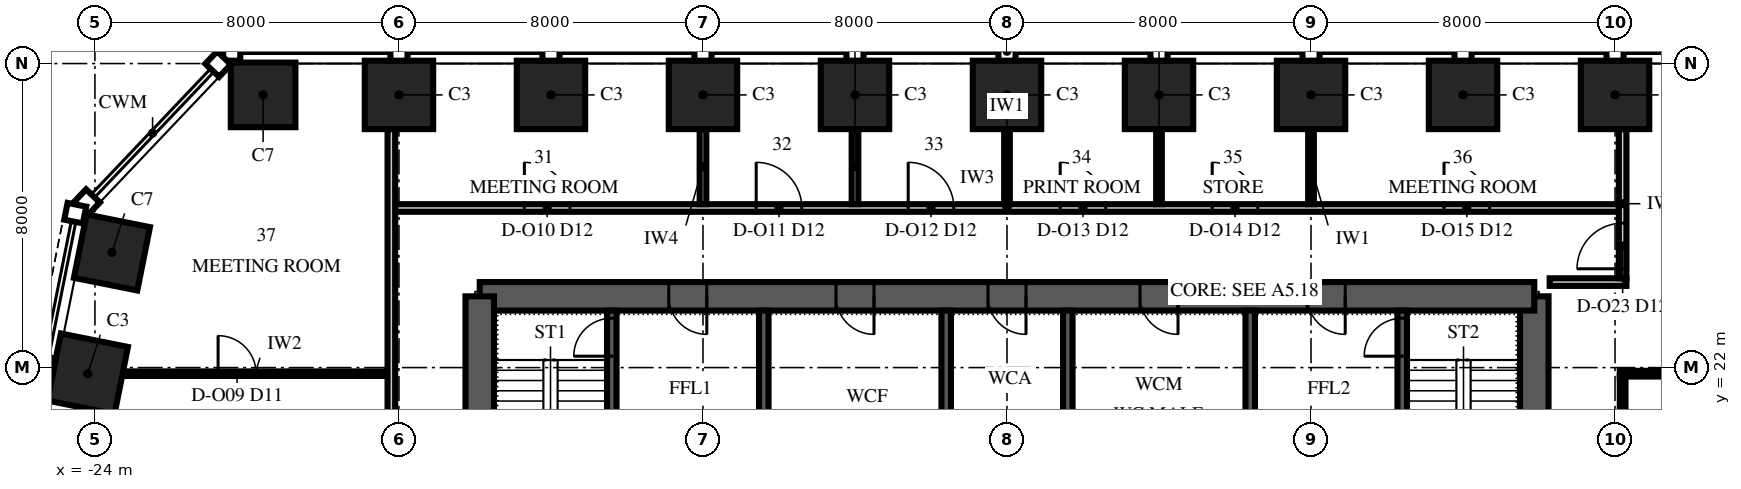
"""IFC4 building model, lengths in metres.
Left out: names, types, materials, properties, quantities, classifications, styles, units other than length and angle.
Written with IfcOpenShell. Run it as: python <this file> out.ifc"""

import sys

from ifc_helpers import new_model, si_unit, direction, frame, frame_2d, origin, origin_2d, place, context, subcontext, project, spatial, polyline, rectangle, outline, extrude, element, fill, save


model = new_model("IFC4")
c1 = context("Model", 3, precision=1e-05, world=origin(), true_north=direction((0.0, 1.0)))
c2 = subcontext(c1, "Body", "Model", "MODEL_VIEW")
j1 = project(units=[si_unit("LENGTHUNIT", "METRE"), si_unit("PLANEANGLEUNIT", "RADIAN")], contexts=[c1])
p1 = place(None, origin())
s1 = spatial("IfcSite", under=j1, at=p1, CompositionType="ELEMENT")
p2 = place(p1, origin())
s2 = spatial("IfcBuilding", under=s1, at=p2, CompositionType="ELEMENT")
p3 = place(p2, frame((0.0, 0.0, 115.0)))
s3 = spatial("IfcBuildingStorey", under=s2, at=p3, CompositionType="ELEMENT", Elevation=115.0)
for number, where, z_axis, x_axis in (
    (1, (16.0, 29.175, 0.0), (0.0, 0.0, 1.0), (-1.0, 0.0, 0.0)),
    (2, (12.0, 29.175, 0.0), (0.0, 0.0, 1.0), (-1.0, 0.0, 0.0)),
    (3, (8.0, 29.175, 0.0), (0.0, 0.0, 1.0), (-1.0, 0.0, 0.0)),
    (4, (4.0, 29.175, 0.0), (0.0, 0.0, 1.0), (-1.0, 0.0, 0.0)),
    (5, (0.0, 29.175, 0.0), (0.0, 0.0, 1.0), (-1.0, 0.0, 0.0)),
    (6, (-4.0, 29.175, 0.0), (0.0, 0.0, 1.0), (-1.0, 0.0, 0.0)),
    (7, (-8.0, 29.175, 0.0), (0.0, 0.0, 1.0), (-1.0, 0.0, 0.0)),
    (8, (-12.0, 29.175, 0.0), (0.0, 0.0, 1.0), (-1.0, 0.0, 0.0)),
    (9, (-16.0, 29.175, 0.0), (0.0, 0.0, 1.0), (-1.0, 0.0, 0.0)),
):
    element("IfcColumn", number, at=place(p3, frame(where, z_axis=z_axis, x_axis=x_axis)), inside=s3, PredefinedType="COLUMN", context=c2, shape_type="SweptSolid", body=[
        extrude(rectangle(XDim=1.8, YDim=1.8, at=origin_2d()), origin(), (0.0, 0.0, 1.0), 4.0),
    ])
for number, where, z_axis, x_axis in (
    (10, (-19.575, 29.175, 0.0), (0.0, 0.0, 1.0), (-1.0, 0.0, 0.0)),
    (11, (-23.553, 25.029, 0.0), (0.0, 0.0, 1.0), (-0.196, -0.981, 0.0)),
):
    element("IfcColumn", number, at=place(p3, frame(where, z_axis=z_axis, x_axis=x_axis)), inside=s3, PredefinedType="COLUMN", context=c2, shape_type="SweptSolid", body=[
        extrude(rectangle(XDim=1.7, YDim=1.7, at=origin_2d()), origin(), (0.0, 0.0, 1.0), 4.0),
    ])
p4 = place(p3, frame((-24.191, 21.838, 0.0), z_axis=(0.0, 0.0, 1.0), x_axis=(-0.196116135138, -0.980580675691, 0.0)))
e12 = element("IfcColumn", 12, at=p4, inside=s3, PredefinedType="COLUMN", context=c2, shape_type="SweptSolid", body=[
    extrude(rectangle(XDim=1.8, YDim=1.8, at=origin_2d()), origin(), (0.0, 0.0, 1.0), 4.0),
])
p5 = place(p3, frame((13.875, 6.125, 0.0), z_axis=(0.0, 0.0, 1.0), x_axis=(0.0, 1.0, 0.0)))
e13 = element("IfcWall", 13, at=p5, inside=s3, PredefinedType="SHEAR", context=c2, shape_type="SweptSolid", body=[
    extrude(outline(polyline([(0.0, -0.375), (17.75, -0.375), (17.75, 0.0), (17.375, 0.0), (17.375, 0.375), (0.375, 0.375), (0.375, 0.0), (0.0, 0.0), (0.0, -0.375)])), origin(), (0.0, 0.0, 1.0), 4.0),
])
p6 = place(p5, frame((4.175, 0.0, 0.0)))
e14 = element("IfcOpeningElement", 14, at=p6, cuts=e13, PredefinedType="OPENING", context=c2, shape_type="SweptSolid", body=[
    extrude(rectangle(XDim=1.8, YDim=2.4, at=frame_2d((0.9, 1.2))), frame((0.0, 0.39, 0.0), z_axis=(0.0, -1.0, 0.0), x_axis=(1.0, 0.0, 0.0)), (0.0, 0.0, 1.0), 0.78),
])
p7 = place(p3, frame((13.875, 23.875, 0.0), z_axis=(0.0, 0.0, 1.0), x_axis=(-1.0, 0.0, 0.0)))
e15 = element("IfcWall", 15, at=p7, inside=s3, PredefinedType="SHEAR", context=c2, shape_type="SweptSolid", body=[
    extrude(rectangle(XDim=27.75, YDim=0.75, at=frame_2d((13.875, 0.0))), origin(), (0.0, 0.0, 1.0), 4.0),
])
p8 = place(p7, frame((21.775, 0.0, 0.0)))
e16 = element("IfcOpeningElement", 16, at=p8, cuts=e15, PredefinedType="OPENING", context=c2, shape_type="SweptSolid", body=[
    extrude(rectangle(XDim=1.0, YDim=2.1, at=frame_2d((0.5, 1.05))), frame((0.0, 0.39, 0.0), z_axis=(0.0, -1.0, 0.0), x_axis=(1.0, 0.0, 0.0)), (0.0, 0.0, 1.0), 0.78),
])
p9 = place(p7, frame((4.975, 0.0, 0.0)))
e17 = element("IfcOpeningElement", 17, at=p9, cuts=e15, PredefinedType="OPENING", context=c2, shape_type="SweptSolid", body=[
    extrude(rectangle(XDim=1.0, YDim=2.1, at=frame_2d((0.5, 1.05))), frame((0.0, 0.39, 0.0), z_axis=(0.0, -1.0, 0.0), x_axis=(1.0, 0.0, 0.0)), (0.0, 0.0, 1.0), 0.78),
])
p10 = place(p7, frame((17.375, 0.0, 0.0)))
e18 = element("IfcOpeningElement", 18, at=p10, cuts=e15, PredefinedType="OPENING", context=c2, shape_type="SweptSolid", body=[
    extrude(rectangle(XDim=1.0, YDim=2.1, at=frame_2d((0.5, 1.05))), frame((0.0, 0.39, 0.0), z_axis=(0.0, -1.0, 0.0), x_axis=(1.0, 0.0, 0.0)), (0.0, 0.0, 1.0), 0.78),
])
p11 = place(p7, frame((13.375, 0.0, 0.0)))
e19 = element("IfcOpeningElement", 19, at=p11, cuts=e15, PredefinedType="OPENING", context=c2, shape_type="SweptSolid", body=[
    extrude(rectangle(XDim=1.0, YDim=2.1, at=frame_2d((0.5, 1.05))), frame((0.0, 0.39, 0.0), z_axis=(0.0, -1.0, 0.0), x_axis=(1.0, 0.0, 0.0)), (0.0, 0.0, 1.0), 0.78),
])
p12 = place(p7, frame((9.375, 0.0, 0.0)))
e20 = element("IfcOpeningElement", 20, at=p12, cuts=e15, PredefinedType="OPENING", context=c2, shape_type="SweptSolid", body=[
    extrude(rectangle(XDim=1.0, YDim=2.1, at=frame_2d((0.5, 1.05))), frame((0.0, 0.39, 0.0), z_axis=(0.0, -1.0, 0.0), x_axis=(1.0, 0.0, 0.0)), (0.0, 0.0, 1.0), 0.78),
])
p13 = place(p3, frame((-13.875, 23.875, 0.0), z_axis=(0.0, 0.0, 1.0), x_axis=(0.0, -1.0, 0.0)))
e21 = element("IfcWall", 21, at=p13, inside=s3, PredefinedType="SHEAR", context=c2, shape_type="SweptSolid", body=[
    extrude(outline(polyline([(0.0, -0.375), (17.75, -0.375), (17.75, 0.0), (17.375, 0.0), (17.375, 0.375), (0.375, 0.375), (0.375, 0.0), (0.0, 0.0), (0.0, -0.375)])), origin(), (0.0, 0.0, 1.0), 4.0),
])
p14 = place(p13, frame((11.775, 0.0, 0.0)))
e22 = element("IfcOpeningElement", 22, at=p14, cuts=e21, PredefinedType="OPENING", context=c2, shape_type="SweptSolid", body=[
    extrude(rectangle(XDim=1.8, YDim=2.4, at=frame_2d((0.9, 1.2))), frame((0.0, 0.39, 0.0), z_axis=(0.0, -1.0, 0.0), x_axis=(1.0, 0.0, 0.0)), (0.0, 0.0, 1.0), 0.78),
])
p15 = place(p3, frame((-10.4, 16.125, 0.0), z_axis=(0.0, 0.0, 1.0), x_axis=(0.0, 1.0, 0.0)))
e23 = element("IfcWall", 23, at=p15, inside=s3, PredefinedType="SHEAR", context=c2, shape_type="SweptSolid", body=[
    extrude(rectangle(XDim=7.375, YDim=0.25, at=frame_2d((3.688, 0.0))), origin(), (0.0, 0.0, 1.0), 4.0),
])
p16 = place(p15, frame((6.175, 0.0, 0.0)))
e24 = element("IfcOpeningElement", 24, at=p16, cuts=e23, PredefinedType="OPENING", context=c2, shape_type="SweptSolid", body=[
    extrude(rectangle(XDim=1.0, YDim=2.1, at=frame_2d((0.5, 1.05))), frame((0.0, 0.14, 0.0), z_axis=(0.0, -1.0, 0.0), x_axis=(1.0, 0.0, 0.0)), (0.0, 0.0, 1.0), 0.28),
])
for number, where, z_axis, x_axis in (
    (25, (-6.4, 16.125, 0.0), (0.0, 0.0, 1.0), (0.0, 1.0, 0.0)),
    (26, (-1.6, 16.125, 0.0), (0.0, 0.0, 1.0), (0.0, 1.0, 0.0)),
    (27, (1.6, 16.125, 0.0), (0.0, 0.0, 1.0), (0.0, 1.0, 0.0)),
    (28, (6.4, 16.125, 0.0), (0.0, 0.0, 1.0), (0.0, 1.0, 0.0)),
):
    element("IfcWall", number, at=place(p3, frame(where, z_axis=z_axis, x_axis=x_axis)), inside=s3, PredefinedType="SHEAR", context=c2, shape_type="SweptSolid", body=[
        extrude(rectangle(XDim=7.375, YDim=0.25, at=frame_2d((3.688, 0.0))), origin(), (0.0, 0.0, 1.0), 4.0),
    ])
p17 = place(p3, frame((10.4, 16.125, 0.0), z_axis=(0.0, 0.0, 1.0), x_axis=(0.0, 1.0, 0.0)))
e29 = element("IfcWall", 29, at=p17, inside=s3, PredefinedType="SHEAR", context=c2, shape_type="SweptSolid", body=[
    extrude(rectangle(XDim=7.375, YDim=0.25, at=frame_2d((3.688, 0.0))), origin(), (0.0, 0.0, 1.0), 4.0),
])
p18 = place(p17, frame((6.175, 0.0, 0.0)))
e30 = element("IfcOpeningElement", 30, at=p18, cuts=e29, PredefinedType="OPENING", context=c2, shape_type="SweptSolid", body=[
    extrude(rectangle(XDim=1.0, YDim=2.1, at=frame_2d((0.5, 1.05))), frame((0.0, 0.14, 0.0), z_axis=(0.0, -1.0, 0.0), x_axis=(1.0, 0.0, 0.0)), (0.0, 0.0, 1.0), 0.28),
])
p19 = place(p3, frame((-23.273, 21.84, 0.0), z_axis=(0.0, 0.0, 1.0), x_axis=(1.0, 0.0, 0.0)))
e31 = element("IfcWall", 31, at=p19, inside=s3, PredefinedType="PARTITIONING", context=c2, shape_type="SweptSolid", body=[
    extrude(rectangle(XDim=6.973, YDim=0.12, at=frame_2d((3.486, 0.0))), origin(), (0.0, 0.0, 1.0), 3.25),
])
p20 = place(p19, frame((2.514, 0.0, 0.0)))
e32 = element("IfcOpeningElement", 32, at=p20, cuts=e31, PredefinedType="OPENING", context=c2, shape_type="SweptSolid", body=[
    extrude(rectangle(XDim=1.0, YDim=2.4, at=frame_2d((0.5, 1.2))), frame((0.0, 0.075, 0.0), z_axis=(0.0, -1.0, 0.0), x_axis=(1.0, 0.0, 0.0)), (0.0, 0.0, 1.0), 0.15),
])
p21 = place(p3, frame((16.125, 21.84, 0.0), z_axis=(0.0, 0.0, 1.0), x_axis=(1.0, 0.0, 0.0)))
e33 = element("IfcWall", 33, at=p21, inside=s3, PredefinedType="PARTITIONING", context=c2, shape_type="SweptSolid", body=[
    extrude(rectangle(XDim=3.75, YDim=0.15, at=frame_2d((1.875, 0.0))), origin(), (0.0, 0.0, 1.0), 3.4),
])
p22 = place(p3, frame((14.28, 24.25, 0.0), z_axis=(0.0, 0.0, 1.0), x_axis=(1.0, 0.0, 0.0)))
e34 = element("IfcWall", 34, at=p22, inside=s3, PredefinedType="PARTITIONING", context=c2, shape_type="SweptSolid", body=[
    extrude(rectangle(XDim=2.02, YDim=0.2, at=frame_2d((1.01, 0.0))), origin(), (0.0, 0.0, 1.0), 3.4),
])
p23 = place(p3, frame((-16.1, 26.2, 0.0), z_axis=(0.0, 0.0, 1.0), x_axis=(1.0, 0.0, 0.0)))
e35 = element("IfcWall", 35, at=p23, inside=s3, PredefinedType="PARTITIONING", context=c2, shape_type="SweptSolid", body=[
    extrude(rectangle(XDim=32.2, YDim=0.2, at=frame_2d((16.1, 0.0))), origin(), (0.0, 0.0, 1.0), 3.4),
])
p24 = place(p23, frame((3.4, 0.0, 0.0)))
e36 = element("IfcOpeningElement", 36, at=p24, cuts=e35, PredefinedType="OPENING", context=c2, shape_type="SweptSolid", body=[
    extrude(rectangle(XDim=1.2, YDim=2.4, at=frame_2d((0.6, 1.2))), frame((0.0, 0.115, 0.0), z_axis=(0.0, -1.0, 0.0), x_axis=(1.0, 0.0, 0.0)), (0.0, 0.0, 1.0), 0.23),
])
p25 = place(p23, frame((9.5, 0.0, 0.0)))
e37 = element("IfcOpeningElement", 37, at=p25, cuts=e35, PredefinedType="OPENING", context=c2, shape_type="SweptSolid", body=[
    extrude(rectangle(XDim=1.2, YDim=2.4, at=frame_2d((0.6, 1.2))), frame((0.0, 0.115, 0.0), z_axis=(0.0, -1.0, 0.0), x_axis=(1.0, 0.0, 0.0)), (0.0, 0.0, 1.0), 0.23),
])
p26 = place(p23, frame((13.5, 0.0, 0.0)))
e38 = element("IfcOpeningElement", 38, at=p26, cuts=e35, PredefinedType="OPENING", context=c2, shape_type="SweptSolid", body=[
    extrude(rectangle(XDim=1.2, YDim=2.4, at=frame_2d((0.6, 1.2))), frame((0.0, 0.115, 0.0), z_axis=(0.0, -1.0, 0.0), x_axis=(1.0, 0.0, 0.0)), (0.0, 0.0, 1.0), 0.23),
])
p27 = place(p23, frame((17.5, 0.0, 0.0)))
e39 = element("IfcOpeningElement", 39, at=p27, cuts=e35, PredefinedType="OPENING", context=c2, shape_type="SweptSolid", body=[
    extrude(rectangle(XDim=1.2, YDim=2.4, at=frame_2d((0.6, 1.2))), frame((0.0, 0.115, 0.0), z_axis=(0.0, -1.0, 0.0), x_axis=(1.0, 0.0, 0.0)), (0.0, 0.0, 1.0), 0.23),
])
p28 = place(p23, frame((21.5, 0.0, 0.0)))
e40 = element("IfcOpeningElement", 40, at=p28, cuts=e35, PredefinedType="OPENING", context=c2, shape_type="SweptSolid", body=[
    extrude(rectangle(XDim=1.2, YDim=2.4, at=frame_2d((0.6, 1.2))), frame((0.0, 0.115, 0.0), z_axis=(0.0, -1.0, 0.0), x_axis=(1.0, 0.0, 0.0)), (0.0, 0.0, 1.0), 0.23),
])
p29 = place(p23, frame((27.6, 0.0, 0.0)))
e41 = element("IfcOpeningElement", 41, at=p29, cuts=e35, PredefinedType="OPENING", context=c2, shape_type="SweptSolid", body=[
    extrude(rectangle(XDim=1.2, YDim=2.4, at=frame_2d((0.6, 1.2))), frame((0.0, 0.115, 0.0), z_axis=(0.0, -1.0, 0.0), x_axis=(1.0, 0.0, 0.0)), (0.0, 0.0, 1.0), 0.23),
])
p30 = place(p3, frame((-16.2, 1.94, 0.0), z_axis=(0.0, 0.0, 1.0), x_axis=(0.0, 1.0, 0.0)))
e42 = element("IfcWall", 42, at=p30, inside=s3, PredefinedType="PARTITIONING", context=c2, shape_type="SweptSolid", body=[
    extrude(rectangle(XDim=26.335, YDim=0.2, at=frame_2d((13.167, 0.0))), origin(), (0.0, 0.0, 1.0), 2.842),
])
p31 = place(p30, frame((6.46, 0.0, 0.0)))
e43 = element("IfcOpeningElement", 43, at=p31, cuts=e42, PredefinedType="OPENING", context=c2, shape_type="SweptSolid", body=[
    extrude(rectangle(XDim=1.2, YDim=2.4, at=frame_2d((0.6, 1.2))), frame((0.0, 0.115, 0.0), z_axis=(0.0, -1.0, 0.0), x_axis=(1.0, 0.0, 0.0)), (0.0, 0.0, 1.0), 0.23),
])
p32 = place(p3, frame((-8.0, 26.3, 0.0), z_axis=(0.0, 0.0, 1.0), x_axis=(0.0, 1.0, 0.0)))
e44 = element("IfcWall", 44, at=p32, inside=s3, PredefinedType="PARTITIONING", context=c2, shape_type="SweptSolid", body=[
    extrude(rectangle(XDim=1.975, YDim=0.175, at=frame_2d((0.987, 0.0))), origin(), (0.0, 0.0, 1.0), 3.4),
])
p33 = place(p3, frame((-4.0, 26.3, 0.0), z_axis=(0.0, 0.0, 1.0), x_axis=(0.0, 1.0, 0.0)))
e45 = element("IfcWall", 45, at=p33, inside=s3, PredefinedType="PARTITIONING", context=c2, shape_type="SweptSolid", body=[
    extrude(rectangle(XDim=1.975, YDim=0.175, at=frame_2d((0.987, 0.0))), origin(), (0.0, 0.0, 1.0), 3.85),
])
p34 = place(p3, frame((0.0, 26.3, 0.0), z_axis=(0.0, 0.0, 1.0), x_axis=(0.0, 1.0, 0.0)))
e46 = element("IfcWall", 46, at=p34, inside=s3, PredefinedType="PARTITIONING", context=c2, shape_type="SweptSolid", body=[
    extrude(rectangle(XDim=1.975, YDim=0.15, at=frame_2d((0.987, 0.0))), origin(), (0.0, 0.0, 1.0), 3.4),
])
p35 = place(p3, frame((4.0, 26.3, 0.0), z_axis=(0.0, 0.0, 1.0), x_axis=(0.0, 1.0, 0.0)))
e47 = element("IfcWall", 47, at=p35, inside=s3, PredefinedType="PARTITIONING", context=c2, shape_type="SweptSolid", body=[
    extrude(rectangle(XDim=1.975, YDim=0.15, at=frame_2d((0.987, 0.0))), origin(), (0.0, 0.0, 1.0), 3.85),
])
p36 = place(p3, frame((8.0, 26.3, 0.0), z_axis=(0.0, 0.0, 1.0), x_axis=(0.0, 1.0, 0.0)))
e48 = element("IfcWall", 48, at=p36, inside=s3, PredefinedType="PARTITIONING", context=c2, shape_type="SweptSolid", body=[
    extrude(rectangle(XDim=1.975, YDim=0.15, at=frame_2d((0.987, 0.0))), origin(), (0.0, 0.0, 1.0), 3.4),
])
p37 = place(p3, frame((16.2, 17.915, 0.0), z_axis=(0.0, 0.0, 1.0), x_axis=(0.0, 1.0, 0.0)))
e49 = element("IfcWall", 49, at=p37, inside=s3, PredefinedType="PARTITIONING", context=c2, shape_type="SweptSolid", body=[
    extrude(rectangle(XDim=3.85, YDim=0.15, at=frame_2d((1.925, 0.0))), origin(), (0.0, 0.0, 1.0), 3.25),
])
p38 = place(p3, frame((16.2, 24.35, 0.0), z_axis=(0.0, 0.0, 1.0), x_axis=(0.0, 1.0, 0.0)))
e50 = element("IfcWall", 50, at=p38, inside=s3, PredefinedType="PARTITIONING", context=c2, shape_type="SweptSolid", body=[
    extrude(rectangle(XDim=3.925, YDim=0.2, at=frame_2d((1.962, 0.0))), origin(), (0.0, 0.0, 1.0), 3.4),
])
p39 = place(p38, frame((0.25, 0.0, 0.0)))
e51 = element("IfcOpeningElement", 51, at=p39, cuts=e50, PredefinedType="OPENING", context=c2, shape_type="SweptSolid", body=[
    extrude(rectangle(XDim=1.2, YDim=2.4, at=frame_2d((0.6, 1.2))), frame((0.0, 0.115, 0.0), z_axis=(0.0, -1.0, 0.0), x_axis=(1.0, 0.0, 0.0)), (0.0, 0.0, 1.0), 0.23),
])
p40 = place(p8, origin())
e52 = element("IfcDoor", 52, at=p40, inside=s3, OperationType="SINGLE_SWING_RIGHT", PredefinedType="DOOR", context=c2, shape_type="SweptSolid", body=[
    extrude(rectangle(XDim=1.0, YDim=2.1, at=frame_2d((0.5, 1.05))), frame((0.0, 0.375, 0.0), z_axis=(0.0, -1.0, 0.0), x_axis=(1.0, 0.0, 0.0)), (0.0, 0.0, 1.0), 0.75),
])
fill(e16, e52)
p41 = place(p9, origin())
e53 = element("IfcDoor", 53, at=p41, inside=s3, OperationType="SINGLE_SWING_RIGHT", PredefinedType="DOOR", context=c2, shape_type="SweptSolid", body=[
    extrude(rectangle(XDim=1.0, YDim=2.1, at=frame_2d((0.5, 1.05))), frame((0.0, 0.375, 0.0), z_axis=(0.0, -1.0, 0.0), x_axis=(1.0, 0.0, 0.0)), (0.0, 0.0, 1.0), 0.75),
])
fill(e17, e53)
p42 = place(p10, origin())
e54 = element("IfcDoor", 54, at=p42, inside=s3, OperationType="SINGLE_SWING_LEFT", PredefinedType="DOOR", context=c2, shape_type="SweptSolid", body=[
    extrude(rectangle(XDim=1.0, YDim=2.1, at=frame_2d((0.5, 1.05))), frame((0.0, 0.375, 0.0), z_axis=(0.0, -1.0, 0.0), x_axis=(1.0, 0.0, 0.0)), (0.0, 0.0, 1.0), 0.75),
])
fill(e18, e54)
p43 = place(p11, origin())
e55 = element("IfcDoor", 55, at=p43, inside=s3, OperationType="SINGLE_SWING_LEFT", PredefinedType="DOOR", context=c2, shape_type="SweptSolid", body=[
    extrude(rectangle(XDim=1.0, YDim=2.1, at=frame_2d((0.5, 1.05))), frame((0.0, 0.375, 0.0), z_axis=(0.0, -1.0, 0.0), x_axis=(1.0, 0.0, 0.0)), (0.0, 0.0, 1.0), 0.75),
])
fill(e19, e55)
p44 = place(p12, origin())
e56 = element("IfcDoor", 56, at=p44, inside=s3, OperationType="SINGLE_SWING_LEFT", PredefinedType="DOOR", context=c2, shape_type="SweptSolid", body=[
    extrude(rectangle(XDim=1.0, YDim=2.1, at=frame_2d((0.5, 1.05))), frame((0.0, 0.375, 0.0), z_axis=(0.0, -1.0, 0.0), x_axis=(1.0, 0.0, 0.0)), (0.0, 0.0, 1.0), 0.75),
])
fill(e20, e56)
p45 = place(p16, origin())
e57 = element("IfcDoor", 57, at=p45, inside=s3, OperationType="SINGLE_SWING_LEFT", PredefinedType="DOOR", context=c2, shape_type="SweptSolid", body=[
    extrude(rectangle(XDim=1.0, YDim=2.1, at=frame_2d((0.5, 1.05))), frame((0.0, 0.125, 0.0), z_axis=(0.0, -1.0, 0.0), x_axis=(1.0, 0.0, 0.0)), (0.0, 0.0, 1.0), 0.25),
])
fill(e24, e57)
p46 = place(p18, origin())
e58 = element("IfcDoor", 58, at=p46, inside=s3, OperationType="SINGLE_SWING_LEFT", PredefinedType="DOOR", context=c2, shape_type="SweptSolid", body=[
    extrude(rectangle(XDim=1.0, YDim=2.1, at=frame_2d((0.5, 1.05))), frame((0.0, 0.125, 0.0), z_axis=(0.0, -1.0, 0.0), x_axis=(1.0, 0.0, 0.0)), (0.0, 0.0, 1.0), 0.25),
])
fill(e30, e58)
p47 = place(p20, origin())
e59 = element("IfcDoor", 59, at=p47, inside=s3, OperationType="SINGLE_SWING_RIGHT", PredefinedType="DOOR", context=c2, shape_type="SweptSolid", body=[
    extrude(rectangle(XDim=1.0, YDim=2.4, at=frame_2d((0.5, 1.2))), frame((0.0, 0.06, 0.0), z_axis=(0.0, -1.0, 0.0), x_axis=(1.0, 0.0, 0.0)), (0.0, 0.0, 1.0), 0.12),
])
fill(e32, e59)
p48 = place(p24, origin())
e60 = element("IfcDoor", 60, at=p48, inside=s3, OperationType="SINGLE_SWING_LEFT", PredefinedType="DOOR", context=c2, shape_type="SweptSolid", body=[
    extrude(rectangle(XDim=1.2, YDim=2.4, at=frame_2d((0.6, 1.2))), frame((0.0, 0.1, 0.0), z_axis=(0.0, -1.0, 0.0), x_axis=(1.0, 0.0, 0.0)), (0.0, 0.0, 1.0), 0.199),
])
fill(e36, e60)
p49 = place(p25, origin())
e61 = element("IfcDoor", 61, at=p49, inside=s3, OperationType="SINGLE_SWING_LEFT", PredefinedType="DOOR", context=c2, shape_type="SweptSolid", body=[
    extrude(rectangle(XDim=1.2, YDim=2.4, at=frame_2d((0.6, 1.2))), frame((0.0, 0.1, 0.0), z_axis=(0.0, -1.0, 0.0), x_axis=(1.0, 0.0, 0.0)), (0.0, 0.0, 1.0), 0.199),
])
fill(e37, e61)
p50 = place(p26, origin())
e62 = element("IfcDoor", 62, at=p50, inside=s3, OperationType="SINGLE_SWING_LEFT", PredefinedType="DOOR", context=c2, shape_type="SweptSolid", body=[
    extrude(rectangle(XDim=1.2, YDim=2.4, at=frame_2d((0.6, 1.2))), frame((0.0, 0.1, 0.0), z_axis=(0.0, -1.0, 0.0), x_axis=(1.0, 0.0, 0.0)), (0.0, 0.0, 1.0), 0.199),
])
fill(e38, e62)
p51 = place(p27, origin())
e63 = element("IfcDoor", 63, at=p51, inside=s3, OperationType="SINGLE_SWING_LEFT", PredefinedType="DOOR", context=c2, shape_type="SweptSolid", body=[
    extrude(rectangle(XDim=1.2, YDim=2.4, at=frame_2d((0.6, 1.2))), frame((0.0, 0.1, 0.0), z_axis=(0.0, -1.0, 0.0), x_axis=(1.0, 0.0, 0.0)), (0.0, 0.0, 1.0), 0.199),
])
fill(e39, e63)
p52 = place(p28, origin())
e64 = element("IfcDoor", 64, at=p52, inside=s3, OperationType="SINGLE_SWING_LEFT", PredefinedType="DOOR", context=c2, shape_type="SweptSolid", body=[
    extrude(rectangle(XDim=1.2, YDim=2.4, at=frame_2d((0.6, 1.2))), frame((0.0, 0.1, 0.0), z_axis=(0.0, -1.0, 0.0), x_axis=(1.0, 0.0, 0.0)), (0.0, 0.0, 1.0), 0.199),
])
fill(e40, e64)
p53 = place(p29, origin())
e65 = element("IfcDoor", 65, at=p53, inside=s3, OperationType="SINGLE_SWING_LEFT", PredefinedType="DOOR", context=c2, shape_type="SweptSolid", body=[
    extrude(rectangle(XDim=1.2, YDim=2.4, at=frame_2d((0.6, 1.2))), frame((0.0, 0.1, 0.0), z_axis=(0.0, -1.0, 0.0), x_axis=(1.0, 0.0, 0.0)), (0.0, 0.0, 1.0), 0.199),
])
fill(e41, e65)
p54 = place(p39, origin())
e66 = element("IfcDoor", 66, at=p54, inside=s3, OperationType="SINGLE_SWING_LEFT", PredefinedType="DOOR", context=c2, shape_type="SweptSolid", body=[
    extrude(rectangle(XDim=1.2, YDim=2.4, at=frame_2d((0.6, 1.2))), frame((0.0, 0.1, 0.0), z_axis=(0.0, -1.0, 0.0), x_axis=(1.0, 0.0, 0.0)), (0.0, 0.0, 1.0), 0.199),
])
fill(e51, e66)
save(model, sys.argv[1])
